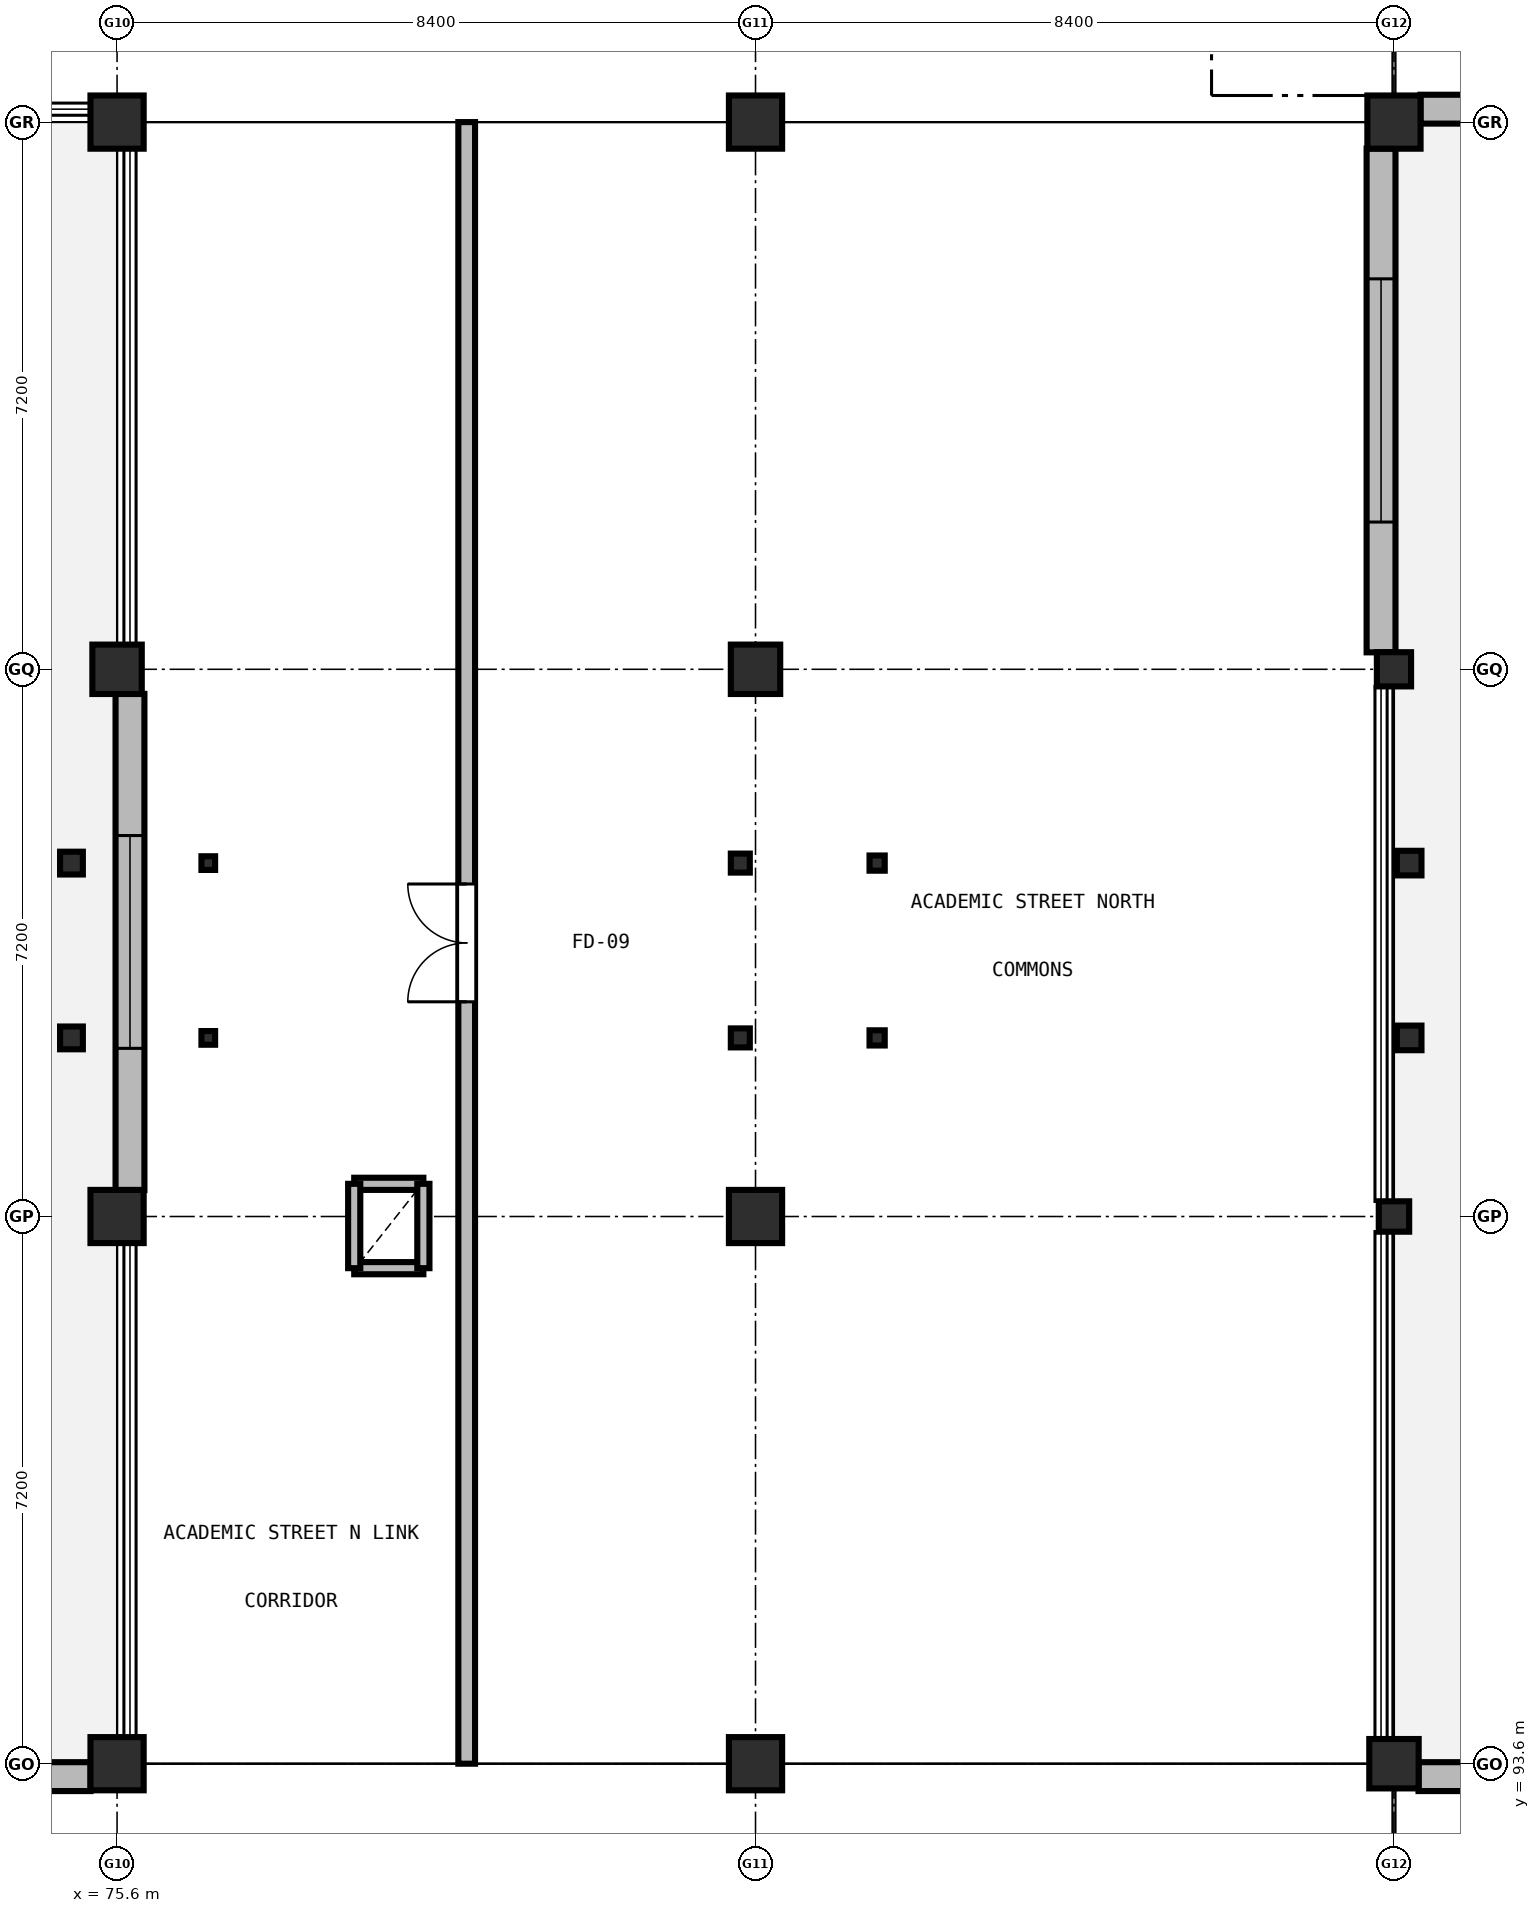
"""IFC4 building model, lengths in metres.
Left out: names, types, materials, properties, quantities, classifications, styles, units other than length and angle.
Written with IfcOpenShell. Run it as: python <this file> out.ifc"""

import sys

from ifc_helpers import new_model, si_unit, direction, frame, frame_2d, origin, origin_2d, place, context, subcontext, project, spatial, rectangle, hollow_rectangle, hollow_circle, i_section, extrude, element, fill, save


model = new_model("IFC4")
c1 = context("Model", 3, precision=1e-05, world=origin(), true_north=direction((0.0, 1.0)))
c2 = subcontext(c1, "Body", "Model", "MODEL_VIEW")
j1 = project(units=[si_unit("LENGTHUNIT", "METRE"), si_unit("PLANEANGLEUNIT", "RADIAN")], contexts=[c1])
p1 = place(None, origin())
s1 = spatial("IfcSite", under=j1, at=p1, CompositionType="ELEMENT")
p2 = place(p1, origin())
s2 = spatial("IfcBuilding", under=s1, at=p2, CompositionType="ELEMENT")
p3 = place(p2, origin())
s3 = spatial("IfcBuildingStorey", under=s2, at=p3, CompositionType="ELEMENT", Elevation=0.0)
for number, where, z_axis, x_axis in (
    (1, (75.6, 93.6, 0.0), (0.0, 0.0, 1.0), (1.0, 0.0, 0.0)),
    (2, (75.6, 100.8, 0.0), (0.0, 0.0, 1.0), (1.0, 0.0, 0.0)),
):
    element("IfcColumn", number, at=place(p3, frame(where, z_axis=z_axis, x_axis=x_axis)), inside=s3, PredefinedType="COLUMN", context=c2, shape_type="SweptSolid", body=[
        extrude(rectangle(XDim=0.7, YDim=0.7, at=origin_2d()), origin(), (0.0, 0.0, 1.0), 5.1),
    ])
p4 = place(p3, frame((75.6, 108.0, 0.0), z_axis=(0.0, 0.0, 1.0), x_axis=(1.0, 0.0, 0.0)))
e3 = element("IfcColumn", 3, at=p4, inside=s3, PredefinedType="COLUMN", context=c2, shape_type="SweptSolid", body=[
    extrude(rectangle(XDim=0.65, YDim=0.65, at=origin_2d()), origin(), (0.0, 0.0, 1.0), 5.1),
])
for number, where, z_axis, x_axis in (
    (4, (75.6, 115.2, 0.0), (0.0, 0.0, 1.0), (1.0, 0.0, 0.0)),
    (5, (84.0, 93.6, 0.0), (0.0, 0.0, 1.0), (1.0, 0.0, 0.0)),
    (6, (84.0, 100.8, 0.0), (0.0, 0.0, 1.0), (1.0, 0.0, 0.0)),
):
    element("IfcColumn", number, at=place(p3, frame(where, z_axis=z_axis, x_axis=x_axis)), inside=s3, PredefinedType="COLUMN", context=c2, shape_type="SweptSolid", body=[
        extrude(rectangle(XDim=0.7, YDim=0.7, at=origin_2d()), origin(), (0.0, 0.0, 1.0), 5.1),
    ])
p5 = place(p3, frame((84.0, 108.0, 0.0), z_axis=(0.0, 0.0, 1.0), x_axis=(1.0, 0.0, 0.0)))
e7 = element("IfcColumn", 7, at=p5, inside=s3, PredefinedType="COLUMN", context=c2, shape_type="SweptSolid", body=[
    extrude(rectangle(XDim=0.65, YDim=0.65, at=origin_2d()), origin(), (0.0, 0.0, 1.0), 5.1),
])
p6 = place(p3, frame((84.0, 115.2, 0.0), z_axis=(0.0, 0.0, 1.0), x_axis=(1.0, 0.0, 0.0)))
e8 = element("IfcColumn", 8, at=p6, inside=s3, PredefinedType="COLUMN", context=c2, shape_type="SweptSolid", body=[
    extrude(rectangle(XDim=0.7, YDim=0.7, at=origin_2d()), origin(), (0.0, 0.0, 1.0), 5.1),
])
p7 = place(p3, frame((92.4, 93.6, 0.0), z_axis=(0.0, 0.0, 1.0), x_axis=(1.0, 0.0, 0.0)))
e9 = element("IfcColumn", 9, at=p7, inside=s3, PredefinedType="COLUMN", context=c2, shape_type="SweptSolid", body=[
    extrude(rectangle(XDim=0.65, YDim=0.65, at=origin_2d()), origin(), (0.0, 0.0, 1.0), 5.1),
])
p8 = place(p3, frame((92.4, 100.8, 0.0), z_axis=(0.0, 0.0, 1.0), x_axis=(1.0, 0.0, 0.0)))
e10 = element("IfcColumn", 10, at=p8, inside=s3, PredefinedType="COLUMN", context=c2, shape_type="SweptSolid", body=[
    extrude(rectangle(XDim=0.4, YDim=0.4, at=origin_2d()), origin(), (0.0, 0.0, 1.0), 5.1),
])
p9 = place(p3, frame((92.4, 108.0, 0.0), z_axis=(0.0, 0.0, 1.0), x_axis=(1.0, 0.0, 0.0)))
e11 = element("IfcColumn", 11, at=p9, inside=s3, PredefinedType="COLUMN", context=c2, shape_type="SweptSolid", body=[
    extrude(rectangle(XDim=0.45, YDim=0.45, at=origin_2d()), origin(), (0.0, 0.0, 1.0), 5.1),
])
p10 = place(p3, frame((92.4, 115.2, 0.0), z_axis=(0.0, 0.0, 1.0), x_axis=(1.0, 0.0, 0.0)))
e12 = element("IfcColumn", 12, at=p10, inside=s3, PredefinedType="COLUMN", context=c2, shape_type="SweptSolid", body=[
    extrude(rectangle(XDim=0.7, YDim=0.7, at=origin_2d()), origin(), (0.0, 0.0, 1.0), 5.1),
])
for number, where, z_axis, x_axis in (
    (13, (75.0, 103.15, 0.0), (0.0, 0.0, 1.0), (1.0, 0.0, 0.0)),
    (14, (75.0, 105.45, 0.0), (0.0, 0.0, 1.0), (1.0, 0.0, 0.0)),
):
    element("IfcColumn", number, at=place(p3, frame(where, z_axis=z_axis, x_axis=x_axis)), inside=s3, PredefinedType="COLUMN", context=c2, shape_type="SweptSolid", body=[
        extrude(i_section(OverallWidth=0.3, OverallDepth=0.3, WebThickness=0.011, FlangeThickness=0.019, FilletRadius=0.027, at=origin_2d()), origin(), (0.0, 0.0, 1.0), 5.1),
    ])
for number, where, z_axis, x_axis in (
    (15, (76.8, 103.15, 0.0), (0.0, 0.0, 1.0), (1.0, 0.0, 0.0)),
    (16, (76.8, 105.45, 0.0), (0.0, 0.0, 1.0), (1.0, 0.0, 0.0)),
):
    element("IfcColumn", number, at=place(p3, frame(where, z_axis=z_axis, x_axis=x_axis)), inside=s3, PredefinedType="COLUMN", context=c2, shape_type="SweptSolid", body=[
        extrude(hollow_rectangle(XDim=0.18, YDim=0.18, WallThickness=0.008, at=origin_2d()), origin(), (0.0, 0.0, 1.0), 5.1),
    ])
for number, where, z_axis, x_axis in (
    (17, (83.8, 103.15, 0.0), (0.0, 0.0, 1.0), (1.0, 0.0, 0.0)),
    (18, (83.8, 105.45, 0.0), (0.0, 0.0, 1.0), (1.0, 0.0, 0.0)),
):
    element("IfcColumn", number, at=place(p3, frame(where, z_axis=z_axis, x_axis=x_axis)), inside=s3, PredefinedType="COLUMN", context=c2, shape_type="SweptSolid", body=[
        extrude(hollow_rectangle(XDim=0.25, YDim=0.25, WallThickness=0.01, at=origin_2d()), origin(), (0.0, 0.0, 1.0), 5.1),
    ])
for number, where, z_axis, x_axis in (
    (19, (85.6, 103.15, 0.0), (0.0, 0.0, 1.0), (1.0, 0.0, 0.0)),
    (20, (85.6, 105.45, 0.0), (0.0, 0.0, 1.0), (1.0, 0.0, 0.0)),
):
    element("IfcColumn", number, at=place(p3, frame(where, z_axis=z_axis, x_axis=x_axis)), inside=s3, PredefinedType="COLUMN", context=c2, shape_type="SweptSolid", body=[
        extrude(hollow_rectangle(XDim=0.2, YDim=0.2, WallThickness=0.01, at=origin_2d()), origin(), (0.0, 0.0, 1.0), 5.1),
    ])
for number, where, z_axis, x_axis in (
    (21, (92.6, 103.15, 0.0), (0.0, 0.0, 1.0), (1.0, 0.0, 0.0)),
    (22, (92.6, 105.45, 0.0), (0.0, 0.0, 1.0), (1.0, 0.0, 0.0)),
):
    element("IfcColumn", number, at=place(p3, frame(where, z_axis=z_axis, x_axis=x_axis)), inside=s3, PredefinedType="COLUMN", context=c2, shape_type="SweptSolid", body=[
        extrude(hollow_circle(Radius=0.162, WallThickness=0.012, at=origin_2d()), origin(), (0.0, 0.0, 1.0), 5.1),
    ])
p11 = place(p3, frame((67.548, 93.43, 0.0), z_axis=(0.0, 0.0, 1.0), x_axis=(1.0, 0.0, 0.0)))
e23 = element("IfcWall", 23, at=p11, inside=s3, PredefinedType="SOLIDWALL", context=c2, shape_type="SweptSolid", body=[
    extrude(rectangle(XDim=7.704, YDim=0.38, at=frame_2d((3.852, 0.0))), origin(), (0.0, 0.0, 1.0), 4.01),
])
p12 = place(p11, frame((2.752, 0.0, 0.0)))
e24 = element("IfcOpeningElement", 24, at=p12, cuts=e23, PredefinedType="OPENING", context=c2, shape_type="SweptSolid", body=[
    extrude(rectangle(XDim=2.2, YDim=2.4, at=frame_2d((1.1, 1.2))), frame((0.0, 0.2, 0.0), z_axis=(0.0, -1.0, 0.0), x_axis=(1.0, 0.0, 0.0)), (0.0, 0.0, 1.0), 0.4),
])
p13 = place(p3, frame((75.77, 101.148, 0.0), z_axis=(0.0, 0.0, 1.0), x_axis=(0.0, 1.0, 0.0)))
e25 = element("IfcWall", 25, at=p13, inside=s3, PredefinedType="SOLIDWALL", context=c2, shape_type="SweptSolid", body=[
    extrude(rectangle(XDim=6.529, YDim=0.38, at=frame_2d((3.265, 0.0))), origin(), (0.0, 0.0, 1.0), 4.11),
])
p14 = place(p13, frame((1.865, 0.0, 0.95)))
e26 = element("IfcOpeningElement", 26, at=p14, cuts=e25, PredefinedType="OPENING", context=c2, shape_type="SweptSolid", body=[
    extrude(rectangle(XDim=2.8, YDim=2.0, at=frame_2d((1.4, 1.0))), frame((0.0, 0.2, 0.0), z_axis=(0.0, -1.0, 0.0), x_axis=(1.0, 0.0, 0.0)), (0.0, 0.0, 1.0), 0.4),
])
p15 = place(p3, frame((100.452, 115.37, 0.0), z_axis=(0.0, 0.0, 1.0), x_axis=(-1.0, 0.0, 0.0)))
e27 = element("IfcWall", 27, at=p15, inside=s3, PredefinedType="SOLIDWALL", context=c2, shape_type="SweptSolid", body=[
    extrude(rectangle(XDim=7.704, YDim=0.38, at=frame_2d((3.852, 0.0))), origin(), (0.0, 0.0, 1.0), 4.01),
])
p16 = place(p15, frame((2.427, 0.0, 0.0)))
e28 = element("IfcOpeningElement", 28, at=p16, cuts=e27, PredefinedType="OPENING", context=c2, shape_type="SweptSolid", body=[
    extrude(rectangle(XDim=1.85, YDim=2.3, at=frame_2d((0.925, 1.15))), frame((0.0, 0.2, 0.0), z_axis=(0.0, -1.0, 0.0), x_axis=(1.0, 0.0, 0.0)), (0.0, 0.0, 1.0), 0.4),
])
p17 = place(p3, frame((92.23, 114.852, 0.0), z_axis=(0.0, 0.0, 1.0), x_axis=(0.0, -1.0, 0.0)))
e29 = element("IfcWall", 29, at=p17, inside=s3, PredefinedType="SOLIDWALL", context=c2, shape_type="SweptSolid", body=[
    extrude(rectangle(XDim=6.629, YDim=0.38, at=frame_2d((3.314, 0.0))), origin(), (0.0, 0.0, 1.0), 4.76),
])
p18 = place(p17, frame((1.715, 0.0, 0.95)))
e30 = element("IfcOpeningElement", 30, at=p18, cuts=e29, PredefinedType="OPENING", context=c2, shape_type="SweptSolid", body=[
    extrude(rectangle(XDim=3.2, YDim=2.2, at=frame_2d((1.6, 1.1))), frame((0.0, 0.2, 0.0), z_axis=(0.0, -1.0, 0.0), x_axis=(1.0, 0.0, 0.0)), (0.0, 0.0, 1.0), 0.4),
])
p19 = place(p3, frame((92.723, 93.43, 0.0), z_axis=(0.0, 0.0, 1.0), x_axis=(1.0, 0.0, 0.0)))
e31 = element("IfcWall", 31, at=p19, inside=s3, PredefinedType="SOLIDWALL", context=c2, shape_type="SweptSolid", body=[
    extrude(rectangle(XDim=7.754, YDim=0.38, at=frame_2d((3.877, 0.0))), origin(), (0.0, 0.0, 1.0), 4.01),
])
p20 = place(p19, frame((2.477, 0.0, 0.95)))
e32 = element("IfcOpeningElement", 32, at=p20, cuts=e31, PredefinedType="OPENING", context=c2, shape_type="SweptSolid", body=[
    extrude(rectangle(XDim=2.8, YDim=2.0, at=frame_2d((1.4, 1.0))), frame((0.0, 0.2, 0.0), z_axis=(0.0, -1.0, 0.0), x_axis=(1.0, 0.0, 0.0)), (0.0, 0.0, 1.0), 0.4),
])
p21 = place(p3, frame((78.72, 100.12, 0.0), z_axis=(0.0, 0.0, 1.0), x_axis=(1.0, 0.0, 0.0)))
e33 = element("IfcWall", 33, at=p21, inside=s3, PredefinedType="PARTITIONING", context=c2, shape_type="SweptSolid", body=[
    extrude(rectangle(XDim=0.91, YDim=0.16, at=frame_2d((0.455, 0.0))), origin(), (0.0, 0.0, 1.0), 4.55),
])
p22 = place(p3, frame((79.63, 101.23, 0.0), z_axis=(0.0, 0.0, 1.0), x_axis=(-1.0, 0.0, 0.0)))
e34 = element("IfcWall", 34, at=p22, inside=s3, PredefinedType="PARTITIONING", context=c2, shape_type="SweptSolid", body=[
    extrude(rectangle(XDim=0.91, YDim=0.16, at=frame_2d((0.455, 0.0))), origin(), (0.0, 0.0, 1.0), 4.005),
])
for number, where, z_axis, x_axis in (
    (35, (78.72, 101.23, 0.0), (0.0, 0.0, 1.0), (0.0, -1.0, 0.0)),
    (36, (79.63, 100.12, 0.0), (0.0, 0.0, 1.0), (0.0, 1.0, 0.0)),
):
    element("IfcWall", number, at=place(p3, frame(where, z_axis=z_axis, x_axis=x_axis)), inside=s3, PredefinedType="PARTITIONING", context=c2, shape_type="SweptSolid", body=[
        extrude(rectangle(XDim=1.11, YDim=0.16, at=frame_2d((0.555, 0.0))), origin(), (0.0, 0.0, 1.0), 4.005),
    ])
p23 = place(p3, frame((80.2, 93.6, 0.0), z_axis=(0.0, 0.0, 1.0), x_axis=(0.0, 1.0, 0.0)))
e37 = element("IfcWall", 37, at=p23, inside=s3, PredefinedType="SOLIDWALL", context=c2, shape_type="SweptSolid", body=[
    extrude(rectangle(XDim=21.6, YDim=0.22, at=frame_2d((10.8, 0.0))), origin(), (0.0, 0.0, 1.0), 4.005),
])
p24 = place(p23, frame((10.025, 0.0, 0.0)))
e38 = element("IfcOpeningElement", 38, at=p24, cuts=e37, PredefinedType="OPENING", context=c2, shape_type="SweptSolid", body=[
    extrude(rectangle(XDim=1.55, YDim=2.2, at=frame_2d((0.775, 1.1))), frame((0.0, 0.12, 0.0), z_axis=(0.0, -1.0, 0.0), x_axis=(1.0, 0.0, 0.0)), (0.0, 0.0, 1.0), 0.24),
])
p25 = place(p14, origin())
e39 = element("IfcWindow", 39, at=p25, inside=s3, PartitioningType="SINGLE_PANEL", PredefinedType="WINDOW", context=c2, shape_type="SweptSolid", body=[
    extrude(rectangle(XDim=2.8, YDim=2.0, at=frame_2d((1.4, 1.0))), frame((0.0, 0.03, 0.0), z_axis=(0.0, -1.0, 0.0), x_axis=(1.0, 0.0, 0.0)), (0.0, 0.0, 1.0), 0.06),
])
fill(e26, e39)
p26 = place(p18, origin())
e40 = element("IfcWindow", 40, at=p26, inside=s3, PartitioningType="SINGLE_PANEL", PredefinedType="WINDOW", context=c2, shape_type="SweptSolid", body=[
    extrude(rectangle(XDim=3.2, YDim=2.2, at=frame_2d((1.6, 1.1))), frame((0.0, 0.03, 0.0), z_axis=(0.0, -1.0, 0.0), x_axis=(1.0, 0.0, 0.0)), (0.0, 0.0, 1.0), 0.06),
])
fill(e30, e40)
p27 = place(p24, origin())
e41 = element("IfcDoor", 41, at=p27, inside=s3, OperationType="DOUBLE_DOOR_SINGLE_SWING", PredefinedType="DOOR", context=c2, shape_type="SweptSolid", body=[
    extrude(rectangle(XDim=1.55, YDim=2.2, at=frame_2d((0.775, 1.1))), frame((0.0, 0.025, 0.0), z_axis=(0.0, -1.0, 0.0), x_axis=(1.0, 0.0, 0.0)), (0.0, 0.0, 1.0), 0.05),
])
fill(e38, e41)
save(model, sys.argv[1])
